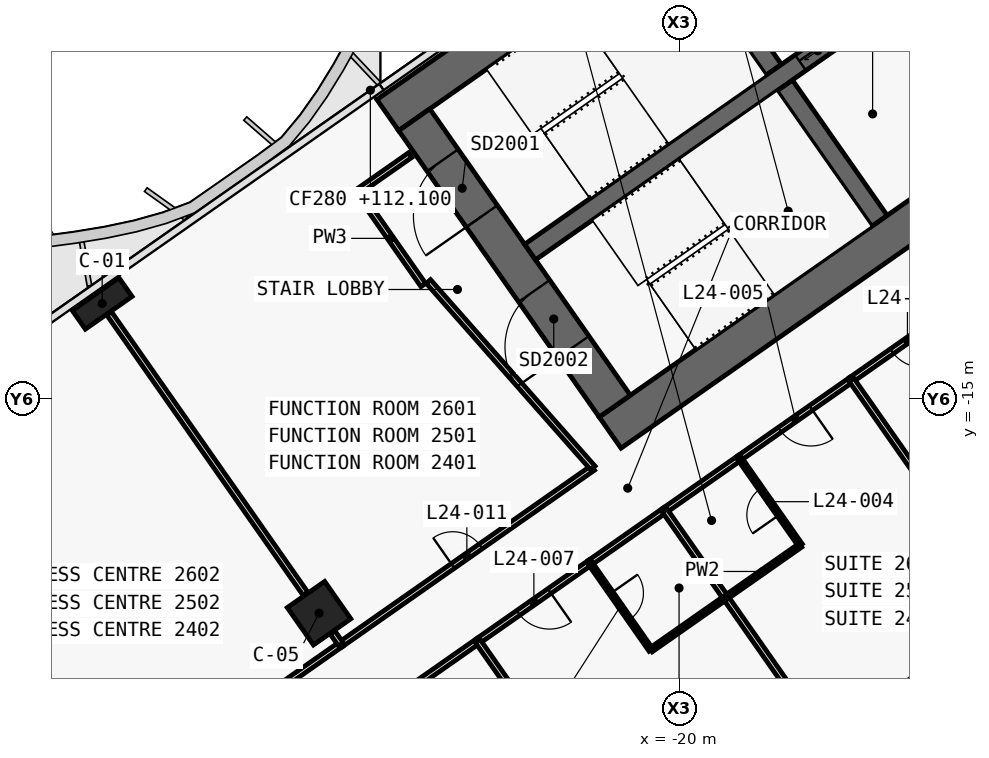
"""IFC4 building model, lengths in metres.
Left out: names, types, materials, properties, quantities, classifications, styles, units other than length and angle.
Written with IfcOpenShell. Run it as: python <this file> out.ifc"""

import sys

from ifc_helpers import new_model, si_unit, direction, frame, frame_2d, origin, origin_2d, place, context, subcontext, project, spatial, polyline, rectangle, outline, extrude, element, fill, save


model = new_model("IFC4")
c1 = context("Model", 3, precision=1e-05, world=origin(), true_north=direction((0.0, 1.0)))
c2 = subcontext(c1, "Body", "Model", "MODEL_VIEW")
j1 = project(units=[si_unit("LENGTHUNIT", "METRE"), si_unit("PLANEANGLEUNIT", "RADIAN")], contexts=[c1])
p1 = place(None, origin())
s1 = spatial("IfcSite", under=j1, at=p1, CompositionType="ELEMENT")
p2 = place(p1, origin())
s2 = spatial("IfcBuilding", under=s1, at=p2, CompositionType="ELEMENT")
p3 = place(p2, frame((0.0, 0.0, 112.1)))
s3 = spatial("IfcBuildingStorey", under=s2, at=p3, CompositionType="ELEMENT", Elevation=112.1)
p4 = place(p3, frame((0.037, 11.867, 0.0), z_axis=(0.0, 0.0, 1.0), x_axis=(-0.819155306259, -0.573571777746, 0.0)))
e1 = element("IfcWall", 1, at=p4, inside=s3, PredefinedType="SHEAR", context=c2, shape_type="SweptSolid", body=[
    extrude(outline(polyline([(33.837, 0.5), (0.7, 0.5), (0.0, -0.5), (33.837, -0.5), (33.837, 0.5)])), origin(), (0.0, 0.0, 1.0), 3.6),
])
p5 = place(p3, frame((0.037, -0.585, 0.0), z_axis=(0.0, 0.0, 1.0), x_axis=(-0.819157152511, -0.573569140985, 0.0)))
e2 = element("IfcWall", 2, at=p5, inside=s3, PredefinedType="SHEAR", context=c2, shape_type="SweptSolid", body=[
    extrude(outline(polyline([(26.695, 0.5), (0.7, 0.5), (0.0, -0.5), (26.695, -0.5), (26.695, 0.5)])), origin(), (0.0, 0.0, 1.0), 3.6),
])
p6 = place(p5, frame((2.995, 0.0, 0.0)))
e3 = element("IfcOpeningElement", 3, at=p6, cuts=e2, PredefinedType="OPENING", context=c2, shape_type="SweptSolid", body=[
    extrude(rectangle(XDim=2.4, YDim=2.1, at=frame_2d((1.2, 1.05))), frame((0.0, 0.51, 0.0), z_axis=(0.0, -1.0, 0.0), x_axis=(1.0, 0.0, 0.0)), (0.0, 0.0, 1.0), 1.02),
])
p7 = place(p5, frame((11.995, 0.0, 0.0)))
e4 = element("IfcOpeningElement", 4, at=p7, cuts=e2, PredefinedType="OPENING", context=c2, shape_type="SweptSolid", body=[
    extrude(rectangle(XDim=2.4, YDim=2.1, at=frame_2d((1.2, 1.05))), frame((0.0, 0.51, 0.0), z_axis=(0.0, -1.0, 0.0), x_axis=(1.0, 0.0, 0.0)), (0.0, 0.0, 1.0), 1.02),
])
p8 = place(p3, frame((-21.708, -15.2, 0.0), z_axis=(0.0, 0.0, 1.0), x_axis=(-0.573576324356, 0.819152122709, 0.0)))
e5 = element("IfcWall", 5, at=p8, inside=s3, PredefinedType="SHEAR", context=c2, shape_type="SweptSolid", body=[
    extrude(outline(polyline([(0.0, 0.5), (0.0, -0.5), (9.2, -0.5), (9.2, 0.5), (0.0, 0.5)])), origin(), (0.0, 0.0, 1.0), 3.6),
])
p9 = place(p8, frame((6.1, 0.0, 0.0)))
e6 = element("IfcOpeningElement", 6, at=p9, cuts=e5, PredefinedType="OPENING", context=c2, shape_type="SweptSolid", body=[
    extrude(rectangle(XDim=1.8, YDim=2.1, at=frame_2d((0.9, 1.05))), frame((0.0, 0.51, 0.0), z_axis=(0.0, -1.0, 0.0), x_axis=(1.0, 0.0, 0.0)), (0.0, 0.0, 1.0), 1.02),
])
p10 = place(p8, frame((1.9, 0.0, 0.0)))
e7 = element("IfcOpeningElement", 7, at=p10, cuts=e5, PredefinedType="OPENING", context=c2, shape_type="SweptSolid", body=[
    extrude(rectangle(XDim=1.8, YDim=2.1, at=frame_2d((0.9, 1.05))), frame((0.0, 0.51, 0.0), z_axis=(0.0, -1.0, 0.0), x_axis=(1.0, 0.0, 0.0)), (0.0, 0.0, 1.0), 1.02),
])
p11 = place(p3, frame((-14.745, -10.324, 0.0), z_axis=(0.0, 0.0, 1.0), x_axis=(-0.57356780395, 0.819158088694, 0.0)))
e8 = element("IfcWall", 8, at=p11, inside=s3, PredefinedType="SHEAR", context=c2, shape_type="SweptSolid", body=[
    extrude(outline(polyline([(4.35, 0.25), (0.0, 0.25), (0.0, -0.25), (4.35, -0.25), (4.35, 0.25)])), origin(), (0.0, 0.0, 1.0), 3.6),
])
p12 = place(p3, frame((-17.527, -6.352, 0.0), z_axis=(0.0, 0.0, 1.0), x_axis=(-0.573530143085, 0.819184457233, 0.0)))
e9 = element("IfcWall", 9, at=p12, inside=s3, PredefinedType="SHEAR", context=c2, shape_type="SweptSolid", body=[
    extrude(outline(polyline([(4.35, -0.25), (4.35, 0.25), (0.0, 0.25), (0.0, -0.25), (4.35, -0.25)])), origin(), (0.0, 0.0, 1.0), 3.6),
])
p13 = place(p3, frame((-2.638, 3.768, 0.0), z_axis=(0.0, 0.0, 1.0), x_axis=(-0.819148977158, -0.573580816643, 0.0)))
e10 = element("IfcWall", 10, at=p13, inside=s3, PredefinedType="SHEAR", context=c2, shape_type="SweptSolid", body=[
    extrude(outline(polyline([(26.0, 0.25), (0.0, 0.25), (0.0, -0.25), (26.0, -0.25), (26.0, 0.25)])), origin(), (0.0, 0.0, 1.0), 3.6),
])
p14 = place(p13, frame((1.169, 0.0, 0.0)))
e11 = element("IfcOpeningElement", 11, at=p14, cuts=e10, PredefinedType="OPENING", context=c2, shape_type="SweptSolid", body=[
    extrude(rectangle(XDim=1.1, YDim=2.1, at=frame_2d((0.55, 1.05))), frame((0.0, 0.26, 0.0), z_axis=(0.0, -1.0, 0.0), x_axis=(1.0, 0.0, 0.0)), (0.0, 0.0, 1.0), 0.52),
])
p15 = place(p13, frame((3.206, 0.0, 0.0)))
e12 = element("IfcOpeningElement", 12, at=p15, cuts=e10, PredefinedType="OPENING", context=c2, shape_type="SweptSolid", body=[
    extrude(rectangle(XDim=1.1, YDim=2.1, at=frame_2d((0.55, 1.05))), frame((0.0, 0.26, 0.0), z_axis=(0.0, -1.0, 0.0), x_axis=(1.0, 0.0, 0.0)), (0.0, 0.0, 1.0), 0.52),
])
p16 = place(p13, frame((5.244, 0.0, 0.0)))
e13 = element("IfcOpeningElement", 13, at=p16, cuts=e10, PredefinedType="OPENING", context=c2, shape_type="SweptSolid", body=[
    extrude(rectangle(XDim=1.1, YDim=2.1, at=frame_2d((0.55, 1.05))), frame((0.0, 0.26, 0.0), z_axis=(0.0, -1.0, 0.0), x_axis=(1.0, 0.0, 0.0)), (0.0, 0.0, 1.0), 0.52),
])
p17 = place(p13, frame((7.281, 0.0, 0.0)))
e14 = element("IfcOpeningElement", 14, at=p17, cuts=e10, PredefinedType="OPENING", context=c2, shape_type="SweptSolid", body=[
    extrude(rectangle(XDim=1.1, YDim=2.1, at=frame_2d((0.55, 1.05))), frame((0.0, 0.26, 0.0), z_axis=(0.0, -1.0, 0.0), x_axis=(1.0, 0.0, 0.0)), (0.0, 0.0, 1.0), 0.52),
])
p18 = place(p13, frame((9.688, 0.0, 0.0)))
e15 = element("IfcOpeningElement", 15, at=p18, cuts=e10, PredefinedType="OPENING", context=c2, shape_type="SweptSolid", body=[
    extrude(rectangle(XDim=1.1, YDim=2.1, at=frame_2d((0.55, 1.05))), frame((0.0, 0.26, 0.0), z_axis=(0.0, -1.0, 0.0), x_axis=(1.0, 0.0, 0.0)), (0.0, 0.0, 1.0), 0.52),
])
p19 = place(p13, frame((11.863, 0.0, 0.0)))
e16 = element("IfcOpeningElement", 16, at=p19, cuts=e10, PredefinedType="OPENING", context=c2, shape_type="SweptSolid", body=[
    extrude(rectangle(XDim=1.1, YDim=2.1, at=frame_2d((0.55, 1.05))), frame((0.0, 0.26, 0.0), z_axis=(0.0, -1.0, 0.0), x_axis=(1.0, 0.0, 0.0)), (0.0, 0.0, 1.0), 0.52),
])
p20 = place(p13, frame((14.038, 0.0, 0.0)))
e17 = element("IfcOpeningElement", 17, at=p20, cuts=e10, PredefinedType="OPENING", context=c2, shape_type="SweptSolid", body=[
    extrude(rectangle(XDim=1.1, YDim=2.1, at=frame_2d((0.55, 1.05))), frame((0.0, 0.26, 0.0), z_axis=(0.0, -1.0, 0.0), x_axis=(1.0, 0.0, 0.0)), (0.0, 0.0, 1.0), 0.52),
])
p21 = place(p13, frame((16.212, 0.0, 0.0)))
e18 = element("IfcOpeningElement", 18, at=p21, cuts=e10, PredefinedType="OPENING", context=c2, shape_type="SweptSolid", body=[
    extrude(rectangle(XDim=1.1, YDim=2.1, at=frame_2d((0.55, 1.05))), frame((0.0, 0.26, 0.0), z_axis=(0.0, -1.0, 0.0), x_axis=(1.0, 0.0, 0.0)), (0.0, 0.0, 1.0), 0.52),
])
p22 = place(p3, frame((-35.197, -12.498, 0.0), z_axis=(0.0, 0.0, 1.0), x_axis=(-0.819152044289, -0.573576436351, 0.0)))
e19 = element("IfcColumn", 19, at=p22, inside=s3, PredefinedType="COLUMN", context=c2, shape_type="SweptSolid", body=[
    extrude(rectangle(XDim=1.5, YDim=0.6, at=origin_2d()), origin(), (0.0, 0.0, 1.0), 3.6),
])
p23 = place(p3, frame((-29.49, -20.649, 0.0), z_axis=(0.0, 0.0, 1.0), x_axis=(-0.819152044289, -0.573576436351, 0.0)))
e20 = element("IfcColumn", 20, at=p23, inside=s3, PredefinedType="COLUMN", context=c2, shape_type="SweptSolid", body=[
    extrude(rectangle(XDim=1.2, YDim=1.2, at=origin_2d()), origin(), (0.0, 0.0, 1.0), 3.6),
])
p24 = place(p3, frame((-28.917, -21.469, 0.0), z_axis=(0.0, 0.0, 1.0), x_axis=(0.819152599934, 0.573575642807, 0.0)))
e21 = element("IfcWall", 21, at=p24, inside=s3, PredefinedType="PARTITIONING", context=c2, shape_type="SweptSolid", body=[
    extrude(rectangle(XDim=8.098, YDim=0.15, at=frame_2d((4.049, 0.0))), origin(), (0.0, 0.0, 1.0), 2.6),
])
p25 = place(p24, frame((3.599, 0.0, 0.0)))
e22 = element("IfcOpeningElement", 22, at=p25, cuts=e21, PredefinedType="OPENING", context=c2, shape_type="SweptSolid", body=[
    extrude(rectangle(XDim=0.9, YDim=2.1, at=frame_2d((0.45, 1.05))), frame((0.0, 0.085, 0.0), z_axis=(0.0, -1.0, 0.0), x_axis=(1.0, 0.0, 0.0)), (0.0, 0.0, 1.0), 0.17),
])
p26 = place(p3, frame((-36.288, -26.63, 0.0), z_axis=(0.0, 0.0, 1.0), x_axis=(0.81915291695, 0.57357519006, 0.0)))
e23 = element("IfcWall", 23, at=p26, inside=s3, PredefinedType="PARTITIONING", context=c2, shape_type="SweptSolid", body=[
    extrude(rectangle(XDim=9.002, YDim=0.15, at=frame_2d((4.501, 0.0))), origin(), (0.0, 0.0, 1.0), 2.5),
])
p27 = place(p26, frame((4.051, 0.0, 0.0)))
e24 = element("IfcOpeningElement", 24, at=p27, cuts=e23, PredefinedType="OPENING", context=c2, shape_type="SweptSolid", body=[
    extrude(rectangle(XDim=0.9, YDim=2.1, at=frame_2d((0.45, 1.05))), frame((0.0, 0.085, 0.0), z_axis=(0.0, -1.0, 0.0), x_axis=(1.0, 0.0, 0.0)), (0.0, 0.0, 1.0), 0.17),
])
p28 = place(p3, frame((-12.532, -12.437, 0.0), z_axis=(0.0, 0.0, 1.0), x_axis=(-0.819145961204, -0.573585123798, 0.0)))
e25 = element("IfcWall", 25, at=p28, inside=s3, PredefinedType="PARTITIONING", context=c2, shape_type="SweptSolid", body=[
    extrude(rectangle(XDim=3.603, YDim=0.15, at=frame_2d((1.802, 0.0))), origin(), (0.0, 0.0, 1.0), 2.6),
])
p29 = place(p28, frame((1.301, 0.0, 0.0)))
e26 = element("IfcOpeningElement", 26, at=p29, cuts=e25, PredefinedType="OPENING", context=c2, shape_type="SweptSolid", body=[
    extrude(rectangle(XDim=1.0, YDim=2.1, at=frame_2d((0.5, 1.05))), frame((0.0, 0.085, 0.0), z_axis=(0.0, -1.0, 0.0), x_axis=(1.0, 0.0, 0.0)), (0.0, 0.0, 1.0), 0.17),
])
p30 = place(p3, frame((-15.48, -14.501, 0.0), z_axis=(0.0, 0.0, 1.0), x_axis=(-0.819145961204, -0.573585123798, 0.0)))
e27 = element("IfcWall", 27, at=p30, inside=s3, PredefinedType="PARTITIONING", context=c2, shape_type="SweptSolid", body=[
    extrude(rectangle(XDim=3.603, YDim=0.15, at=frame_2d((1.802, 0.0))), origin(), (0.0, 0.0, 1.0), 3.32),
])
p31 = place(p30, frame((1.302, 0.0, 0.0)))
e28 = element("IfcOpeningElement", 28, at=p31, cuts=e27, PredefinedType="OPENING", context=c2, shape_type="SweptSolid", body=[
    extrude(rectangle(XDim=1.0, YDim=2.1, at=frame_2d((0.5, 1.05))), frame((0.0, 0.085, 0.0), z_axis=(0.0, -1.0, 0.0), x_axis=(1.0, 0.0, 0.0)), (0.0, 0.0, 1.0), 0.17),
])
p32 = place(p3, frame((-18.429, -16.566, 0.0), z_axis=(0.0, 0.0, 1.0), x_axis=(-0.819146032251, -0.573585022335, 0.0)))
e29 = element("IfcWall", 29, at=p32, inside=s3, PredefinedType="PARTITIONING", context=c2, shape_type="SweptSolid", body=[
    extrude(rectangle(XDim=2.404, YDim=0.15, at=frame_2d((1.202, 0.0))), origin(), (0.0, 0.0, 1.0), 2.6),
])
p33 = place(p3, frame((-22.362, -19.32, 0.0), z_axis=(0.0, 0.0, 1.0), x_axis=(-0.819145961204, -0.573585123798, 0.0)))
e30 = element("IfcWall", 30, at=p33, inside=s3, PredefinedType="PARTITIONING", context=c2, shape_type="SweptSolid", body=[
    extrude(rectangle(XDim=3.603, YDim=0.15, at=frame_2d((1.802, 0.0))), origin(), (0.0, 0.0, 1.0), 3.32),
])
p34 = place(p33, frame((1.301, 0.0, 0.0)))
e31 = element("IfcOpeningElement", 31, at=p34, cuts=e30, PredefinedType="OPENING", context=c2, shape_type="SweptSolid", body=[
    extrude(rectangle(XDim=1.0, YDim=2.1, at=frame_2d((0.5, 1.05))), frame((0.0, 0.085, 0.0), z_axis=(0.0, -1.0, 0.0), x_axis=(1.0, 0.0, 0.0)), (0.0, 0.0, 1.0), 0.17),
])
p35 = place(p3, frame((-20.395, -17.943, 0.0), z_axis=(0.0, 0.0, 1.0), x_axis=(-0.819146032251, -0.573585022335, 0.0)))
e32 = element("IfcWall", 32, at=p35, inside=s3, PredefinedType="PARTITIONING", context=c2, shape_type="SweptSolid", body=[
    extrude(rectangle(XDim=2.404, YDim=0.15, at=frame_2d((1.202, 0.0))), origin(), (0.0, 0.0, 1.0), 2.6),
])
p36 = place(p3, frame((-25.31, -21.384, 0.0), z_axis=(0.0, 0.0, 1.0), x_axis=(-0.819145946981, -0.573585144111, 0.0)))
e33 = element("IfcWall", 33, at=p36, inside=s3, PredefinedType="PARTITIONING", context=c2, shape_type="SweptSolid", body=[
    extrude(rectangle(XDim=6.004, YDim=0.15, at=frame_2d((3.002, 0.0))), origin(), (0.0, 0.0, 1.0), 2.6),
])
p37 = place(p36, frame((2.552, 0.0, 0.0)))
e34 = element("IfcOpeningElement", 34, at=p37, cuts=e33, PredefinedType="OPENING", context=c2, shape_type="SweptSolid", body=[
    extrude(rectangle(XDim=0.9, YDim=2.1, at=frame_2d((0.45, 1.05))), frame((0.0, 0.085, 0.0), z_axis=(0.0, -1.0, 0.0), x_axis=(1.0, 0.0, 0.0)), (0.0, 0.0, 1.0), 0.17),
])
p38 = place(p3, frame((-26.746, -12.014, 0.0), z_axis=(0.0, 0.0, 1.0), x_axis=(-0.573560650686, 0.819163097304, 0.0)))
e35 = element("IfcWall", 35, at=p38, inside=s3, PredefinedType="PARTITIONING", context=c2, shape_type="SweptSolid", body=[
    extrude(rectangle(XDim=3.0, YDim=0.15, at=frame_2d((1.5, 0.0))), origin(), (0.0, 0.0, 1.0), 3.32),
])
p39 = place(p3, frame((-28.467, -9.556, 0.0), z_axis=(0.0, 0.0, 1.0), x_axis=(0.819109000826, 0.573637903879, 0.0)))
e36 = element("IfcWall", 36, at=p39, inside=s3, PredefinedType="PARTITIONING", context=c2, shape_type="SweptSolid", body=[
    extrude(rectangle(XDim=1.68, YDim=0.15, at=frame_2d((0.84, 0.0))), origin(), (0.0, 0.0, 1.0), 3.32),
])
p40 = place(p3, frame((-22.284, -16.827, 0.0), z_axis=(0.0, 0.0, 1.0), x_axis=(-0.661545117561, 0.749905365651, 0.0)))
e37 = element("IfcWall", 37, at=p40, inside=s3, PredefinedType="PARTITIONING", context=c2, shape_type="SweptSolid", body=[
    extrude(rectangle(XDim=6.543, YDim=0.15, at=frame_2d((3.271, 0.0))), origin(), (0.0, 0.0, 1.0), 2.6),
])
p41 = place(p3, frame((-28.916, -21.468, 0.0), z_axis=(0.0, 0.0, 1.0), x_axis=(-0.572944929411, 0.819593867633, 0.0)))
e38 = element("IfcWall", 38, at=p41, inside=s3, PredefinedType="PARTITIONING", context=c2, shape_type="SweptSolid", body=[
    extrude(rectangle(XDim=0.38, YDim=0.15, at=frame_2d((0.19, 0.0))), origin(), (0.0, 0.0, 1.0), 2.6),
])
p42 = place(p3, frame((-29.845, -20.141, 0.0), z_axis=(0.0, 0.0, 1.0), x_axis=(-0.573558725113, 0.819164445546, 0.0)))
e39 = element("IfcWall", 39, at=p42, inside=s3, PredefinedType="PARTITIONING", context=c2, shape_type="SweptSolid", body=[
    extrude(rectangle(XDim=9.01, YDim=0.15, at=frame_2d((4.505, 0.0))), origin(), (0.0, 0.0, 1.0), 2.6),
])
p43 = place(p3, frame((-11.294, -20.482, 0.0), z_axis=(0.0, 0.0, 1.0), x_axis=(-0.573572324301, 0.819154923562, 0.0)))
e40 = element("IfcWall", 40, at=p43, inside=s3, PredefinedType="PARTITIONING", context=c2, shape_type="SweptSolid", body=[
    extrude(rectangle(XDim=7.3, YDim=0.15, at=frame_2d((3.65, 0.0))), origin(), (0.0, 0.0, 1.0), 2.5),
])
p44 = place(p3, frame((-18.79, -20.239, 0.0), z_axis=(0.0, 0.0, 1.0), x_axis=(0.819141114317, 0.573592045652, 0.0)))
e41 = element("IfcWall", 41, at=p44, inside=s3, PredefinedType="PARTITIONING", context=c2, shape_type="SweptSolid", body=[
    extrude(rectangle(XDim=2.4, YDim=0.12, at=frame_2d((1.2, 0.0))), origin(), (0.0, 0.0, 1.0), 2.6),
])
p45 = place(p3, frame((-16.823, -18.861, 0.0), z_axis=(0.0, 0.0, 1.0), x_axis=(-0.573608623498, 0.819129505664, 0.0)))
e42 = element("IfcWall", 42, at=p45, inside=s3, PredefinedType="PARTITIONING", context=c2, shape_type="SweptSolid", body=[
    extrude(rectangle(XDim=2.8, YDim=0.12, at=frame_2d((1.4, 0.0))), origin(), (0.0, 0.0, 1.0), 3.32),
])
p46 = place(p45, frame((0.975, 0.0, 0.0)))
e43 = element("IfcOpeningElement", 43, at=p46, cuts=e42, PredefinedType="OPENING", context=c2, shape_type="SweptSolid", body=[
    extrude(rectangle(XDim=0.85, YDim=2.05, at=frame_2d((0.425, 1.025))), frame((0.0, 0.07, 0.0), z_axis=(0.0, -1.0, 0.0), x_axis=(1.0, 0.0, 0.0)), (0.0, 0.0, 1.0), 0.14),
])
p47 = place(p3, frame((-16.594, -23.375, 0.0), z_axis=(0.0, 0.0, 1.0), x_axis=(-0.573594994199, 0.819139049631, 0.0)))
e44 = element("IfcWall", 44, at=p47, inside=s3, PredefinedType="PARTITIONING", context=c2, shape_type="SweptSolid", body=[
    extrude(rectangle(XDim=3.829, YDim=0.15, at=frame_2d((1.915, 0.0))), origin(), (0.0, 0.0, 1.0), 2.6),
])
p48 = place(p3, frame((-18.79, -20.238, 0.0), z_axis=(0.0, 0.0, 1.0), x_axis=(-0.57364959175, 0.819100815459, 0.0)))
e45 = element("IfcWall", 45, at=p48, inside=s3, PredefinedType="PARTITIONING", context=c2, shape_type="SweptSolid", body=[
    extrude(rectangle(XDim=2.8, YDim=0.15, at=frame_2d((1.4, 0.0))), origin(), (0.0, 0.0, 1.0), 2.6),
])
p49 = place(p3, frame((-22.363, -19.321, 0.0), z_axis=(0.0, 0.0, 1.0), x_axis=(0.57364959175, -0.819100815459, 0.0)))
e46 = element("IfcWall", 46, at=p49, inside=s3, PredefinedType="PARTITIONING", context=c2, shape_type="SweptSolid", body=[
    extrude(rectangle(XDim=2.8, YDim=0.12, at=frame_2d((1.4, 0.0))), origin(), (0.0, 0.0, 1.0), 3.32),
])
p50 = place(p49, frame((0.975, 0.0, 0.0)))
e47 = element("IfcOpeningElement", 47, at=p50, cuts=e46, PredefinedType="OPENING", context=c2, shape_type="SweptSolid", body=[
    extrude(rectangle(XDim=0.85, YDim=2.05, at=frame_2d((0.425, 1.025))), frame((0.0, 0.07, 0.0), z_axis=(0.0, -1.0, 0.0), x_axis=(1.0, 0.0, 0.0)), (0.0, 0.0, 1.0), 0.14),
])
p51 = place(p3, frame((-20.756, -21.615, 0.0), z_axis=(0.0, 0.0, 1.0), x_axis=(0.819188907105, 0.573523787192, 0.0)))
e48 = element("IfcWall", 48, at=p51, inside=s3, PredefinedType="PARTITIONING", context=c2, shape_type="SweptSolid", body=[
    extrude(rectangle(XDim=2.4, YDim=0.12, at=frame_2d((1.2, 0.0))), origin(), (0.0, 0.0, 1.0), 2.6),
])
p52 = place(p3, frame((-21.124, -27.365, 0.0), z_axis=(0.0, 0.0, 1.0), x_axis=(-0.573572324301, 0.819154923562, 0.0)))
e49 = element("IfcWall", 49, at=p52, inside=s3, PredefinedType="PARTITIONING", context=c2, shape_type="SweptSolid", body=[
    extrude(rectangle(XDim=7.3, YDim=0.15, at=frame_2d((3.65, 0.0))), origin(), (0.0, 0.0, 1.0), 2.5),
])
p53 = place(p21, origin())
e50 = element("IfcDoor", 50, at=p53, inside=s3, OperationType="SLIDING_TO_RIGHT", PredefinedType="DOOR", context=c2, shape_type="SweptSolid", body=[
    extrude(rectangle(XDim=1.1, YDim=2.1, at=frame_2d((0.55, 1.05))), frame((0.0, 0.025, 0.0), z_axis=(0.0, -1.0, 0.0), x_axis=(1.0, 0.0, 0.0)), (0.0, 0.0, 1.0), 0.05),
])
fill(e18, e50)
p54 = place(p9, origin())
e51 = element("IfcDoor", 51, at=p54, inside=s3, OperationType="DOUBLE_DOOR_SINGLE_SWING", PredefinedType="DOOR", context=c2, shape_type="SweptSolid", body=[
    extrude(rectangle(XDim=1.8, YDim=2.1, at=frame_2d((0.9, 1.05))), frame((0.0, 0.025, 0.0), z_axis=(0.0, -1.0, 0.0), x_axis=(1.0, 0.0, 0.0)), (0.0, 0.0, 1.0), 0.05),
])
fill(e6, e51)
p55 = place(p10, origin())
e52 = element("IfcDoor", 52, at=p55, inside=s3, OperationType="DOUBLE_DOOR_SINGLE_SWING", PredefinedType="DOOR", context=c2, shape_type="SweptSolid", body=[
    extrude(rectangle(XDim=1.8, YDim=2.1, at=frame_2d((0.9, 1.05))), frame((0.0, 0.025, 0.0), z_axis=(0.0, -1.0, 0.0), x_axis=(1.0, 0.0, 0.0)), (0.0, 0.0, 1.0), 0.05),
])
fill(e7, e52)
p56 = place(p29, origin())
e53 = element("IfcDoor", 53, at=p56, inside=s3, OperationType="SINGLE_SWING_LEFT", PredefinedType="DOOR", context=c2, shape_type="SweptSolid", body=[
    extrude(rectangle(XDim=1.0, YDim=2.1, at=frame_2d((0.5, 1.05))), frame((0.0, 0.025, 0.0), z_axis=(0.0, -1.0, 0.0), x_axis=(1.0, 0.0, 0.0)), (0.0, 0.0, 1.0), 0.05),
])
fill(e26, e53)
p57 = place(p46, origin())
e54 = element("IfcDoor", 54, at=p57, inside=s3, OperationType="SINGLE_SWING_RIGHT", PredefinedType="DOOR", context=c2, shape_type="SweptSolid", body=[
    extrude(rectangle(XDim=0.85, YDim=2.05, at=frame_2d((0.425, 1.025))), frame((0.0, 0.025, 0.0), z_axis=(0.0, -1.0, 0.0), x_axis=(1.0, 0.0, 0.0)), (0.0, 0.0, 1.0), 0.05),
])
fill(e43, e54)
p58 = place(p31, origin())
e55 = element("IfcDoor", 55, at=p58, inside=s3, OperationType="SINGLE_SWING_LEFT", PredefinedType="DOOR", context=c2, shape_type="SweptSolid", body=[
    extrude(rectangle(XDim=1.0, YDim=2.1, at=frame_2d((0.5, 1.05))), frame((0.0, 0.025, 0.0), z_axis=(0.0, -1.0, 0.0), x_axis=(1.0, 0.0, 0.0)), (0.0, 0.0, 1.0), 0.05),
])
fill(e28, e55)
p59 = place(p50, origin())
e56 = element("IfcDoor", 56, at=p59, inside=s3, OperationType="SINGLE_SWING_RIGHT", PredefinedType="DOOR", context=c2, shape_type="SweptSolid", body=[
    extrude(rectangle(XDim=0.85, YDim=2.05, at=frame_2d((0.425, 1.025))), frame((0.0, 0.025, 0.0), z_axis=(0.0, -1.0, 0.0), x_axis=(1.0, 0.0, 0.0)), (0.0, 0.0, 1.0), 0.05),
])
fill(e47, e56)
p60 = place(p34, origin())
e57 = element("IfcDoor", 57, at=p60, inside=s3, OperationType="SINGLE_SWING_LEFT", PredefinedType="DOOR", context=c2, shape_type="SweptSolid", body=[
    extrude(rectangle(XDim=1.0, YDim=2.1, at=frame_2d((0.5, 1.05))), frame((0.0, 0.025, 0.0), z_axis=(0.0, -1.0, 0.0), x_axis=(1.0, 0.0, 0.0)), (0.0, 0.0, 1.0), 0.05),
])
fill(e31, e57)
p61 = place(p25, origin())
e58 = element("IfcDoor", 58, at=p61, inside=s3, OperationType="SINGLE_SWING_LEFT", PredefinedType="DOOR", context=c2, shape_type="SweptSolid", body=[
    extrude(rectangle(XDim=0.9, YDim=2.1, at=frame_2d((0.45, 1.05))), frame((0.0, 0.025, 0.0), z_axis=(0.0, -1.0, 0.0), x_axis=(1.0, 0.0, 0.0)), (0.0, 0.0, 1.0), 0.05),
])
fill(e22, e58)
save(model, sys.argv[1])
